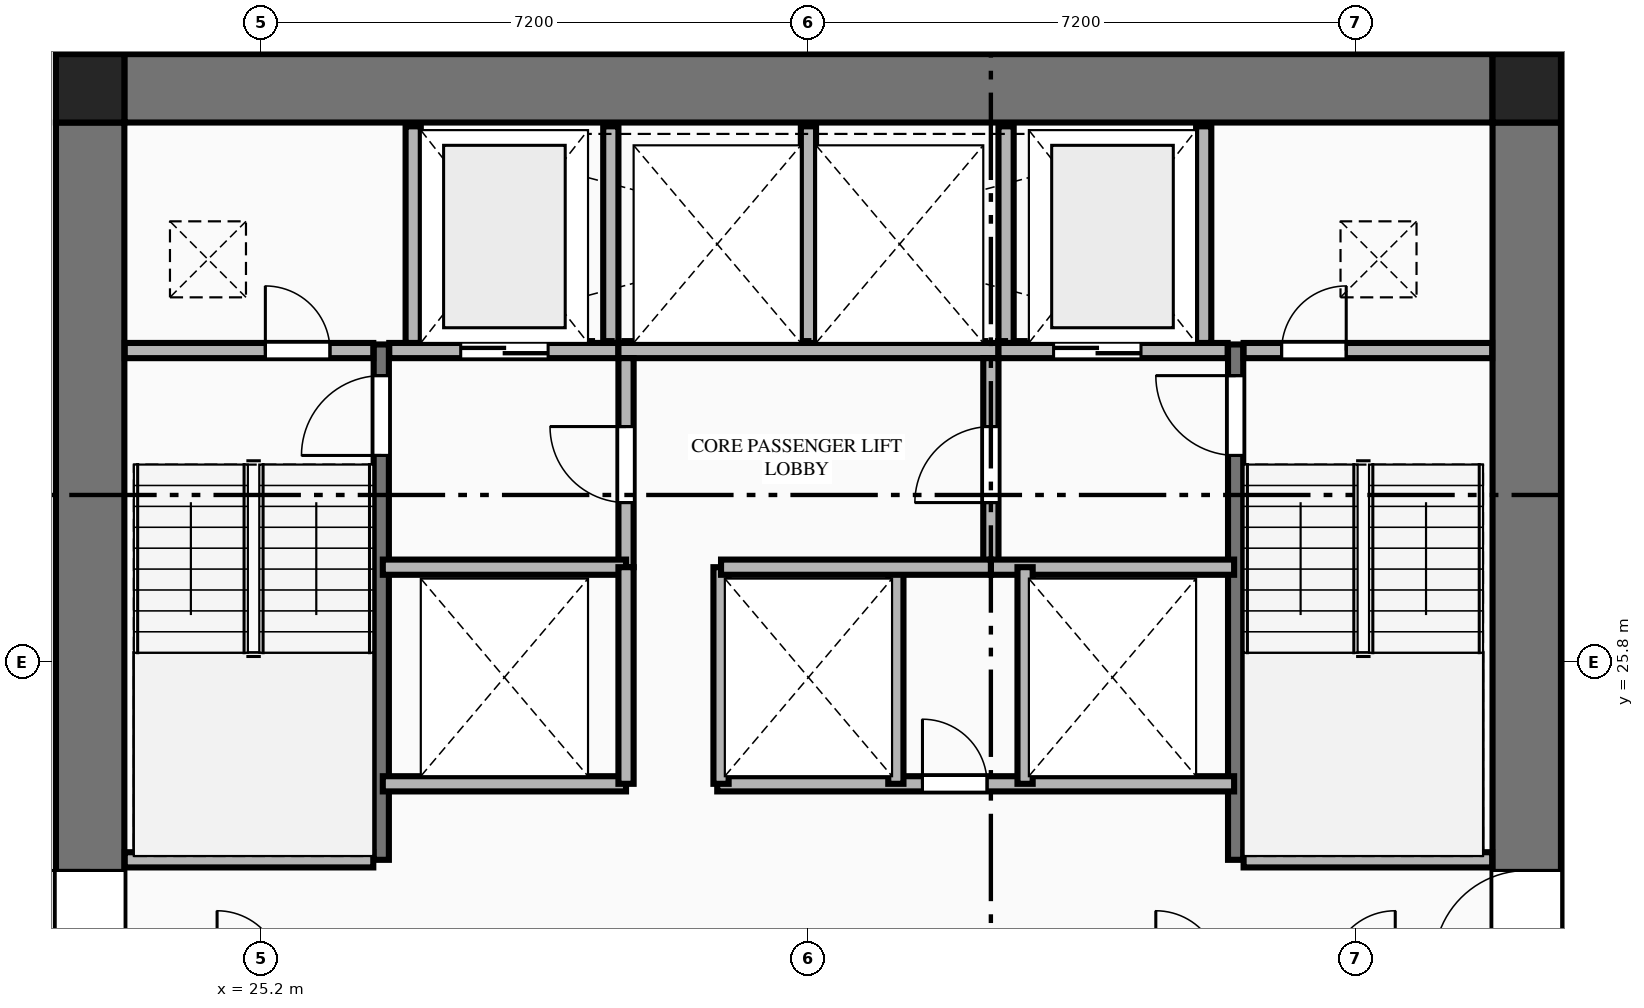
"""IFC4 building model, lengths in metres.
Left out: names, types, materials, properties, quantities, classifications, styles, units other than length and angle.
Written with IfcOpenShell. Run it as: python <this file> out.ifc"""

import sys

from ifc_helpers import new_model, si_unit, direction, frame, frame_2d, origin, origin_2d, place, context, subcontext, project, spatial, rectangle, extrude, element, fill, save


model = new_model("IFC4")
c1 = context("Model", 3, precision=1e-05, world=origin(), true_north=direction((0.0, 1.0)))
c2 = subcontext(c1, "Body", "Model", "MODEL_VIEW")
j1 = project(units=[si_unit("LENGTHUNIT", "METRE"), si_unit("PLANEANGLEUNIT", "RADIAN")], contexts=[c1])
p1 = place(None, origin())
s1 = spatial("IfcSite", under=j1, at=p1, CompositionType="ELEMENT")
p2 = place(p1, origin())
s2 = spatial("IfcBuilding", under=s1, at=p2, CompositionType="ELEMENT")
p3 = place(p2, frame((0.0, 0.0, 32.0)))
s3 = spatial("IfcBuildingStorey", under=s2, at=p3, CompositionType="ELEMENT", Elevation=32.0)
for number, where, z_axis, x_axis in (
    (1, (41.85, 33.35, 0.0), (0.0, 0.0, 1.0), (1.0, 0.0, 0.0)),
    (2, (22.95, 33.35, 0.0), (0.0, 0.0, 1.0), (1.0, 0.0, 0.0)),
):
    element("IfcColumn", number, at=place(p3, frame(where, z_axis=z_axis, x_axis=x_axis)), inside=s3, PredefinedType="COLUMN", context=c2, shape_type="SweptSolid", body=[
        extrude(rectangle(XDim=0.9, YDim=0.9, at=origin_2d()), origin(), (0.0, 0.0, 1.0), 3.55),
    ])
p4 = place(p3, frame((23.4, 33.35, 0.0), z_axis=(0.0, 0.0, 1.0), x_axis=(1.0, 0.0, 0.0)))
e3 = element("IfcWall", 3, at=p4, inside=s3, PredefinedType="SHEAR", context=c2, shape_type="SweptSolid", body=[
    extrude(rectangle(XDim=18.0, YDim=0.9, at=frame_2d((9.0, 0.0))), origin(), (0.0, 0.0, 1.0), 3.33),
])
p5 = place(p3, frame((22.95, 18.9, 0.0), z_axis=(0.0, 0.0, 1.0), x_axis=(0.0, 1.0, 0.0)))
e4 = element("IfcWall", 4, at=p5, inside=s3, PredefinedType="SHEAR", context=c2, shape_type="SweptSolid", body=[
    extrude(rectangle(XDim=14.0, YDim=0.9, at=frame_2d((7.0, 0.0))), origin(), (0.0, 0.0, 1.0), 3.33),
])
p6 = place(p5, frame((2.94, 0.0, 0.0)))
e5 = element("IfcOpeningElement", 5, at=p6, cuts=e4, PredefinedType="OPENING", context=c2, shape_type="SweptSolid", body=[
    extrude(rectangle(XDim=1.22, YDim=2.25, at=frame_2d((0.61, 1.125))), frame((0.0, 0.46, 0.0), z_axis=(0.0, -1.0, 0.0), x_axis=(1.0, 0.0, 0.0)), (0.0, 0.0, 1.0), 0.92),
])
p7 = place(p3, frame((41.85, 18.9, 0.0), z_axis=(0.0, 0.0, 1.0), x_axis=(0.0, 1.0, 0.0)))
e6 = element("IfcWall", 6, at=p7, inside=s3, PredefinedType="SHEAR", context=c2, shape_type="SweptSolid", body=[
    extrude(rectangle(XDim=14.0, YDim=0.9, at=frame_2d((7.0, 0.0))), origin(), (0.0, 0.0, 1.0), 3.33),
])
p8 = place(p7, frame((2.94, 0.0, 0.0)))
e7 = element("IfcOpeningElement", 7, at=p8, cuts=e6, PredefinedType="OPENING", context=c2, shape_type="SweptSolid", body=[
    extrude(rectangle(XDim=1.22, YDim=2.25, at=frame_2d((0.61, 1.125))), frame((0.0, 0.46, 0.0), z_axis=(0.0, -1.0, 0.0), x_axis=(1.0, 0.0, 0.0)), (0.0, 0.0, 1.0), 0.92),
])
p9 = place(p3, frame((26.78, 23.2, 0.0), z_axis=(0.0, 0.0, 1.0), x_axis=(0.0, 1.0, 0.0)))
e8 = element("IfcWall", 8, at=p9, inside=s3, PredefinedType="SHEAR", context=c2, shape_type="SweptSolid", body=[
    extrude(rectangle(XDim=6.78, YDim=0.2, at=frame_2d((3.39, 0.0))), origin(), (0.0, 0.0, 1.0), 3.55),
])
p10 = place(p9, frame((5.32, 0.0, 0.0)))
e9 = element("IfcOpeningElement", 9, at=p10, cuts=e8, PredefinedType="OPENING", context=c2, shape_type="SweptSolid", body=[
    extrude(rectangle(XDim=1.05, YDim=2.15, at=frame_2d((0.525, 1.075))), frame((0.0, 0.11, 0.0), z_axis=(0.0, -1.0, 0.0), x_axis=(1.0, 0.0, 0.0)), (0.0, 0.0, 1.0), 0.22),
])
p11 = place(p3, frame((23.405, 23.2, 0.0), z_axis=(0.0, 0.0, 1.0), x_axis=(1.0, 0.0, 0.0)))
e10 = element("IfcWall", 10, at=p11, inside=s3, PredefinedType="PLUMBINGWALL", context=c2, shape_type="SweptSolid", body=[
    extrude(rectangle(XDim=3.27, YDim=0.2, at=frame_2d((1.635, 0.0))), origin(), (0.0, 0.0, 1.0), 3.33),
])
p12 = place(p3, frame((38.02, 23.2, 0.0), z_axis=(0.0, 0.0, 1.0), x_axis=(0.0, 1.0, 0.0)))
e11 = element("IfcWall", 11, at=p12, inside=s3, PredefinedType="SHEAR", context=c2, shape_type="SweptSolid", body=[
    extrude(rectangle(XDim=6.78, YDim=0.2, at=frame_2d((3.39, 0.0))), origin(), (0.0, 0.0, 1.0), 3.55),
])
p13 = place(p12, frame((5.32, 0.0, 0.0)))
e12 = element("IfcOpeningElement", 12, at=p13, cuts=e11, PredefinedType="OPENING", context=c2, shape_type="SweptSolid", body=[
    extrude(rectangle(XDim=1.05, YDim=2.15, at=frame_2d((0.525, 1.075))), frame((0.0, 0.11, 0.0), z_axis=(0.0, -1.0, 0.0), x_axis=(1.0, 0.0, 0.0)), (0.0, 0.0, 1.0), 0.22),
])
p14 = place(p3, frame((38.125, 23.2, 0.0), z_axis=(0.0, 0.0, 1.0), x_axis=(1.0, 0.0, 0.0)))
e13 = element("IfcWall", 13, at=p14, inside=s3, PredefinedType="PLUMBINGWALL", context=c2, shape_type="SweptSolid", body=[
    extrude(rectangle(XDim=3.27, YDim=0.2, at=frame_2d((1.635, 0.0))), origin(), (0.0, 0.0, 1.0), 3.33),
])
p15 = place(p3, frame((23.405, 29.9, 0.0), z_axis=(0.0, 0.0, 1.0), x_axis=(1.0, 0.0, 0.0)))
e14 = element("IfcWall", 14, at=p15, inside=s3, PredefinedType="PLUMBINGWALL", context=c2, shape_type="SweptSolid", body=[
    extrude(rectangle(XDim=3.27, YDim=0.2, at=frame_2d((1.635, 0.0))), origin(), (0.0, 0.0, 1.0), 3.33),
])
p16 = place(p15, frame((1.85, 0.0, 0.0)))
e15 = element("IfcOpeningElement", 15, at=p16, cuts=e14, PredefinedType="OPENING", context=c2, shape_type="SweptSolid", body=[
    extrude(rectangle(XDim=0.85, YDim=2.05, at=frame_2d((0.425, 1.025))), frame((0.0, 0.11, 0.0), z_axis=(0.0, -1.0, 0.0), x_axis=(1.0, 0.0, 0.0)), (0.0, 0.0, 1.0), 0.22),
])
p17 = place(p3, frame((26.885, 29.9, 0.0), z_axis=(0.0, 0.0, 1.0), x_axis=(1.0, 0.0, 0.0)))
e16 = element("IfcWall", 16, at=p17, inside=s3, PredefinedType="PLUMBINGWALL", context=c2, shape_type="SweptSolid", body=[
    extrude(rectangle(XDim=3.015, YDim=0.2, at=frame_2d((1.507, 0.0))), origin(), (0.0, 0.0, 1.0), 3.33),
])
p18 = place(p17, frame((0.94, 0.0, 0.0)))
e17 = element("IfcOpeningElement", 17, at=p18, cuts=e16, PredefinedType="OPENING", context=c2, shape_type="SweptSolid", body=[
    extrude(rectangle(XDim=1.15, YDim=2.2, at=frame_2d((0.575, 1.1))), frame((0.0, 0.11, 0.0), z_axis=(0.0, -1.0, 0.0), x_axis=(1.0, 0.0, 0.0)), (0.0, 0.0, 1.0), 0.22),
])
p19 = place(p3, frame((29.9, 29.9, 0.0), z_axis=(0.0, 0.0, 1.0), x_axis=(1.0, 0.0, 0.0)))
e18 = element("IfcWall", 18, at=p19, inside=s3, PredefinedType="PLUMBINGWALL", context=c2, shape_type="SweptSolid", body=[
    extrude(rectangle(XDim=5.0, YDim=0.2, at=frame_2d((2.5, 0.0))), origin(), (0.0, 0.0, 1.0), 3.33),
])
p20 = place(p3, frame((34.9, 29.9, 0.0), z_axis=(0.0, 0.0, 1.0), x_axis=(1.0, 0.0, 0.0)))
e19 = element("IfcWall", 19, at=p20, inside=s3, PredefinedType="PLUMBINGWALL", context=c2, shape_type="SweptSolid", body=[
    extrude(rectangle(XDim=3.015, YDim=0.2, at=frame_2d((1.508, 0.0))), origin(), (0.0, 0.0, 1.0), 3.33),
])
p21 = place(p20, frame((0.725, 0.0, 0.0)))
e20 = element("IfcOpeningElement", 20, at=p21, cuts=e19, PredefinedType="OPENING", context=c2, shape_type="SweptSolid", body=[
    extrude(rectangle(XDim=1.15, YDim=2.2, at=frame_2d((0.575, 1.1))), frame((0.0, 0.11, 0.0), z_axis=(0.0, -1.0, 0.0), x_axis=(1.0, 0.0, 0.0)), (0.0, 0.0, 1.0), 0.22),
])
p22 = place(p3, frame((38.125, 29.9, 0.0), z_axis=(0.0, 0.0, 1.0), x_axis=(1.0, 0.0, 0.0)))
e21 = element("IfcWall", 21, at=p22, inside=s3, PredefinedType="PLUMBINGWALL", context=c2, shape_type="SweptSolid", body=[
    extrude(rectangle(XDim=3.27, YDim=0.2, at=frame_2d((1.635, 0.0))), origin(), (0.0, 0.0, 1.0), 3.33),
])
p23 = place(p22, frame((0.5, 0.0, 0.0)))
e22 = element("IfcOpeningElement", 22, at=p23, cuts=e21, PredefinedType="OPENING", context=c2, shape_type="SweptSolid", body=[
    extrude(rectangle(XDim=0.85, YDim=2.05, at=frame_2d((0.425, 1.025))), frame((0.0, 0.11, 0.0), z_axis=(0.0, -1.0, 0.0), x_axis=(1.0, 0.0, 0.0)), (0.0, 0.0, 1.0), 0.22),
])
for number, where, z_axis, x_axis in (
    (23, (27.2, 30.0, 0.0), (0.0, 0.0, 1.0), (0.0, 1.0, 0.0)),
    (24, (29.8, 30.0, 0.0), (0.0, 0.0, 1.0), (0.0, 1.0, 0.0)),
    (25, (32.4, 30.0, 0.0), (0.0, 0.0, 1.0), (0.0, 1.0, 0.0)),
    (26, (35.0, 30.0, 0.0), (0.0, 0.0, 1.0), (0.0, 1.0, 0.0)),
    (27, (37.6, 30.0, 0.0), (0.0, 0.0, 1.0), (0.0, 1.0, 0.0)),
):
    element("IfcWall", number, at=place(p3, frame(where, z_axis=z_axis, x_axis=x_axis)), inside=s3, PredefinedType="PLUMBINGWALL", context=c2, shape_type="SweptSolid", body=[
        extrude(rectangle(XDim=2.85, YDim=0.2, at=frame_2d((1.425, 0.0))), origin(), (0.0, 0.0, 1.0), 3.33),
    ])
p24 = place(p3, frame((30.0, 27.05, 0.0), z_axis=(0.0, 0.0, 1.0), x_axis=(0.0, 1.0, 0.0)))
e28 = element("IfcWall", 28, at=p24, inside=s3, PredefinedType="PLUMBINGWALL", context=c2, shape_type="SweptSolid", body=[
    extrude(rectangle(XDim=2.75, YDim=0.2, at=frame_2d((1.375, 0.0))), origin(), (0.0, 0.0, 1.0), 3.33),
])
p25 = place(p24, frame((0.85, 0.0, 0.0)))
e29 = element("IfcOpeningElement", 29, at=p25, cuts=e28, PredefinedType="OPENING", context=c2, shape_type="SweptSolid", body=[
    extrude(rectangle(XDim=1.0, YDim=2.15, at=frame_2d((0.5, 1.075))), frame((0.0, 0.11, 0.0), z_axis=(0.0, -1.0, 0.0), x_axis=(1.0, 0.0, 0.0)), (0.0, 0.0, 1.0), 0.22),
])
p26 = place(p3, frame((26.8, 27.05, 0.0), z_axis=(0.0, 0.0, 1.0), x_axis=(1.0, 0.0, 0.0)))
e30 = element("IfcWall", 30, at=p26, inside=s3, PredefinedType="PLUMBINGWALL", context=c2, shape_type="SweptSolid", body=[
    extrude(rectangle(XDim=3.2, YDim=0.2, at=frame_2d((1.6, 0.0))), origin(), (0.0, 0.0, 1.0), 3.33),
])
p27 = place(p3, frame((34.8, 27.05, 0.0), z_axis=(0.0, 0.0, 1.0), x_axis=(0.0, 1.0, 0.0)))
e31 = element("IfcWall", 31, at=p27, inside=s3, PredefinedType="PLUMBINGWALL", context=c2, shape_type="SweptSolid", body=[
    extrude(rectangle(XDim=2.75, YDim=0.2, at=frame_2d((1.375, 0.0))), origin(), (0.0, 0.0, 1.0), 3.33),
])
p28 = place(p27, frame((0.85, 0.0, 0.0)))
e32 = element("IfcOpeningElement", 32, at=p28, cuts=e31, PredefinedType="OPENING", context=c2, shape_type="SweptSolid", body=[
    extrude(rectangle(XDim=1.0, YDim=2.15, at=frame_2d((0.5, 1.075))), frame((0.0, 0.11, 0.0), z_axis=(0.0, -1.0, 0.0), x_axis=(1.0, 0.0, 0.0)), (0.0, 0.0, 1.0), 0.22),
])
for number, where, z_axis, x_axis in (
    (33, (34.8, 27.05, 0.0), (0.0, 0.0, 1.0), (1.0, 0.0, 0.0)),
    (34, (26.8, 24.2, 0.0), (0.0, 0.0, 1.0), (1.0, 0.0, 0.0)),
):
    element("IfcWall", number, at=place(p3, frame(where, z_axis=z_axis, x_axis=x_axis)), inside=s3, PredefinedType="PLUMBINGWALL", context=c2, shape_type="SweptSolid", body=[
        extrude(rectangle(XDim=3.2, YDim=0.2, at=frame_2d((1.6, 0.0))), origin(), (0.0, 0.0, 1.0), 3.33),
    ])
p29 = place(p3, frame((30.0, 24.2, 0.0), z_axis=(0.0, 0.0, 1.0), x_axis=(0.0, 1.0, 0.0)))
e35 = element("IfcWall", 35, at=p29, inside=s3, PredefinedType="PLUMBINGWALL", context=c2, shape_type="SweptSolid", body=[
    extrude(rectangle(XDim=2.85, YDim=0.2, at=frame_2d((1.425, 0.0))), origin(), (0.0, 0.0, 1.0), 3.33),
])
p30 = place(p3, frame((31.2, 24.2, 0.0), z_axis=(0.0, 0.0, 1.0), x_axis=(1.0, 0.0, 0.0)))
e36 = element("IfcWall", 36, at=p30, inside=s3, PredefinedType="PLUMBINGWALL", context=c2, shape_type="SweptSolid", body=[
    extrude(rectangle(XDim=6.8, YDim=0.2, at=frame_2d((3.4, 0.0))), origin(), (0.0, 0.0, 1.0), 3.33),
])
p31 = place(p30, frame((2.7, 0.0, 0.0)))
e37 = element("IfcOpeningElement", 37, at=p31, cuts=e36, PredefinedType="OPENING", context=c2, shape_type="SweptSolid", body=[
    extrude(rectangle(XDim=0.85, YDim=2.05, at=frame_2d((0.425, 1.025))), frame((0.0, 0.11, 0.0), z_axis=(0.0, -1.0, 0.0), x_axis=(1.0, 0.0, 0.0)), (0.0, 0.0, 1.0), 0.22),
])
for number, where, z_axis, x_axis in (
    (38, (31.25, 24.2, 0.0), (0.0, 0.0, 1.0), (0.0, 1.0, 0.0)),
    (39, (33.55, 24.2, 0.0), (0.0, 0.0, 1.0), (0.0, 1.0, 0.0)),
    (40, (35.25, 24.2, 0.0), (0.0, 0.0, 1.0), (0.0, 1.0, 0.0)),
):
    element("IfcWall", number, at=place(p3, frame(where, z_axis=z_axis, x_axis=x_axis)), inside=s3, PredefinedType="PLUMBINGWALL", context=c2, shape_type="SweptSolid", body=[
        extrude(rectangle(XDim=2.85, YDim=0.2, at=frame_2d((1.425, 0.0))), origin(), (0.0, 0.0, 1.0), 3.33),
    ])
p32 = place(p3, frame((31.25, 27.05, 0.0), z_axis=(0.0, 0.0, 1.0), x_axis=(1.0, 0.0, 0.0)))
e41 = element("IfcWall", 41, at=p32, inside=s3, PredefinedType="PLUMBINGWALL", context=c2, shape_type="SweptSolid", body=[
    extrude(rectangle(XDim=3.55, YDim=0.2, at=frame_2d((1.775, 0.0))), origin(), (0.0, 0.0, 1.0), 3.33),
])
p33 = place(p6, origin())
e42 = element("IfcDoor", 42, at=p33, inside=s3, OperationType="SINGLE_SWING_RIGHT", PredefinedType="DOOR", context=c2, shape_type="SweptSolid", body=[
    extrude(rectangle(XDim=1.22, YDim=2.25, at=frame_2d((0.61, 1.125))), frame((0.0, 0.025, 0.0), z_axis=(0.0, -1.0, 0.0), x_axis=(1.0, 0.0, 0.0)), (0.0, 0.0, 1.0), 0.05),
])
fill(e5, e42)
p34 = place(p8, origin())
e43 = element("IfcDoor", 43, at=p34, inside=s3, OperationType="SINGLE_SWING_LEFT", PredefinedType="DOOR", context=c2, shape_type="SweptSolid", body=[
    extrude(rectangle(XDim=1.22, YDim=2.25, at=frame_2d((0.61, 1.125))), frame((0.0, 0.025, 0.0), z_axis=(0.0, -1.0, 0.0), x_axis=(1.0, 0.0, 0.0)), (0.0, 0.0, 1.0), 0.05),
])
fill(e7, e43)
p35 = place(p10, origin())
e44 = element("IfcDoor", 44, at=p35, inside=s3, OperationType="SINGLE_SWING_LEFT", PredefinedType="DOOR", context=c2, shape_type="SweptSolid", body=[
    extrude(rectangle(XDim=1.05, YDim=2.15, at=frame_2d((0.525, 1.075))), frame((0.0, 0.025, 0.0), z_axis=(0.0, -1.0, 0.0), x_axis=(1.0, 0.0, 0.0)), (0.0, 0.0, 1.0), 0.05),
])
fill(e9, e44)
p36 = place(p13, origin())
e45 = element("IfcDoor", 45, at=p36, inside=s3, OperationType="SINGLE_SWING_RIGHT", PredefinedType="DOOR", context=c2, shape_type="SweptSolid", body=[
    extrude(rectangle(XDim=1.05, YDim=2.15, at=frame_2d((0.525, 1.075))), frame((0.0, 0.025, 0.0), z_axis=(0.0, -1.0, 0.0), x_axis=(1.0, 0.0, 0.0)), (0.0, 0.0, 1.0), 0.05),
])
fill(e12, e45)
p37 = place(p16, origin())
e46 = element("IfcDoor", 46, at=p37, inside=s3, OperationType="SINGLE_SWING_LEFT", PredefinedType="DOOR", context=c2, shape_type="SweptSolid", body=[
    extrude(rectangle(XDim=0.85, YDim=2.05, at=frame_2d((0.425, 1.025))), frame((0.0, 0.025, 0.0), z_axis=(0.0, -1.0, 0.0), x_axis=(1.0, 0.0, 0.0)), (0.0, 0.0, 1.0), 0.05),
])
fill(e15, e46)
p38 = place(p23, origin())
e47 = element("IfcDoor", 47, at=p38, inside=s3, OperationType="SINGLE_SWING_RIGHT", PredefinedType="DOOR", context=c2, shape_type="SweptSolid", body=[
    extrude(rectangle(XDim=0.85, YDim=2.05, at=frame_2d((0.425, 1.025))), frame((0.0, 0.025, 0.0), z_axis=(0.0, -1.0, 0.0), x_axis=(1.0, 0.0, 0.0)), (0.0, 0.0, 1.0), 0.05),
])
fill(e22, e47)
p39 = place(p18, origin())
e48 = element("IfcDoor", 48, at=p39, inside=s3, OperationType="DOUBLE_DOOR_SLIDING", PredefinedType="DOOR", context=c2, shape_type="SweptSolid", body=[
    extrude(rectangle(XDim=1.15, YDim=2.2, at=frame_2d((0.575, 1.1))), frame((0.0, 0.025, 0.0), z_axis=(0.0, -1.0, 0.0), x_axis=(1.0, 0.0, 0.0)), (0.0, 0.0, 1.0), 0.05),
])
fill(e17, e48)
p40 = place(p21, origin())
e49 = element("IfcDoor", 49, at=p40, inside=s3, OperationType="DOUBLE_DOOR_SLIDING", PredefinedType="DOOR", context=c2, shape_type="SweptSolid", body=[
    extrude(rectangle(XDim=1.15, YDim=2.2, at=frame_2d((0.575, 1.1))), frame((0.0, 0.025, 0.0), z_axis=(0.0, -1.0, 0.0), x_axis=(1.0, 0.0, 0.0)), (0.0, 0.0, 1.0), 0.05),
])
fill(e20, e49)
p41 = place(p25, origin())
e50 = element("IfcDoor", 50, at=p41, inside=s3, OperationType="SINGLE_SWING_RIGHT", PredefinedType="DOOR", context=c2, shape_type="SweptSolid", body=[
    extrude(rectangle(XDim=1.0, YDim=2.15, at=frame_2d((0.5, 1.075))), frame((0.0, 0.025, 0.0), z_axis=(0.0, -1.0, 0.0), x_axis=(1.0, 0.0, 0.0)), (0.0, 0.0, 1.0), 0.05),
])
fill(e29, e50)
p42 = place(p28, origin())
e51 = element("IfcDoor", 51, at=p42, inside=s3, OperationType="SINGLE_SWING_LEFT", PredefinedType="DOOR", context=c2, shape_type="SweptSolid", body=[
    extrude(rectangle(XDim=1.0, YDim=2.15, at=frame_2d((0.5, 1.075))), frame((0.0, 0.025, 0.0), z_axis=(0.0, -1.0, 0.0), x_axis=(1.0, 0.0, 0.0)), (0.0, 0.0, 1.0), 0.05),
])
fill(e32, e51)
p43 = place(p31, origin())
e52 = element("IfcDoor", 52, at=p43, inside=s3, OperationType="SINGLE_SWING_LEFT", PredefinedType="DOOR", context=c2, shape_type="SweptSolid", body=[
    extrude(rectangle(XDim=0.85, YDim=2.05, at=frame_2d((0.425, 1.025))), frame((0.0, 0.025, 0.0), z_axis=(0.0, -1.0, 0.0), x_axis=(1.0, 0.0, 0.0)), (0.0, 0.0, 1.0), 0.05),
])
fill(e37, e52)
save(model, sys.argv[1])
